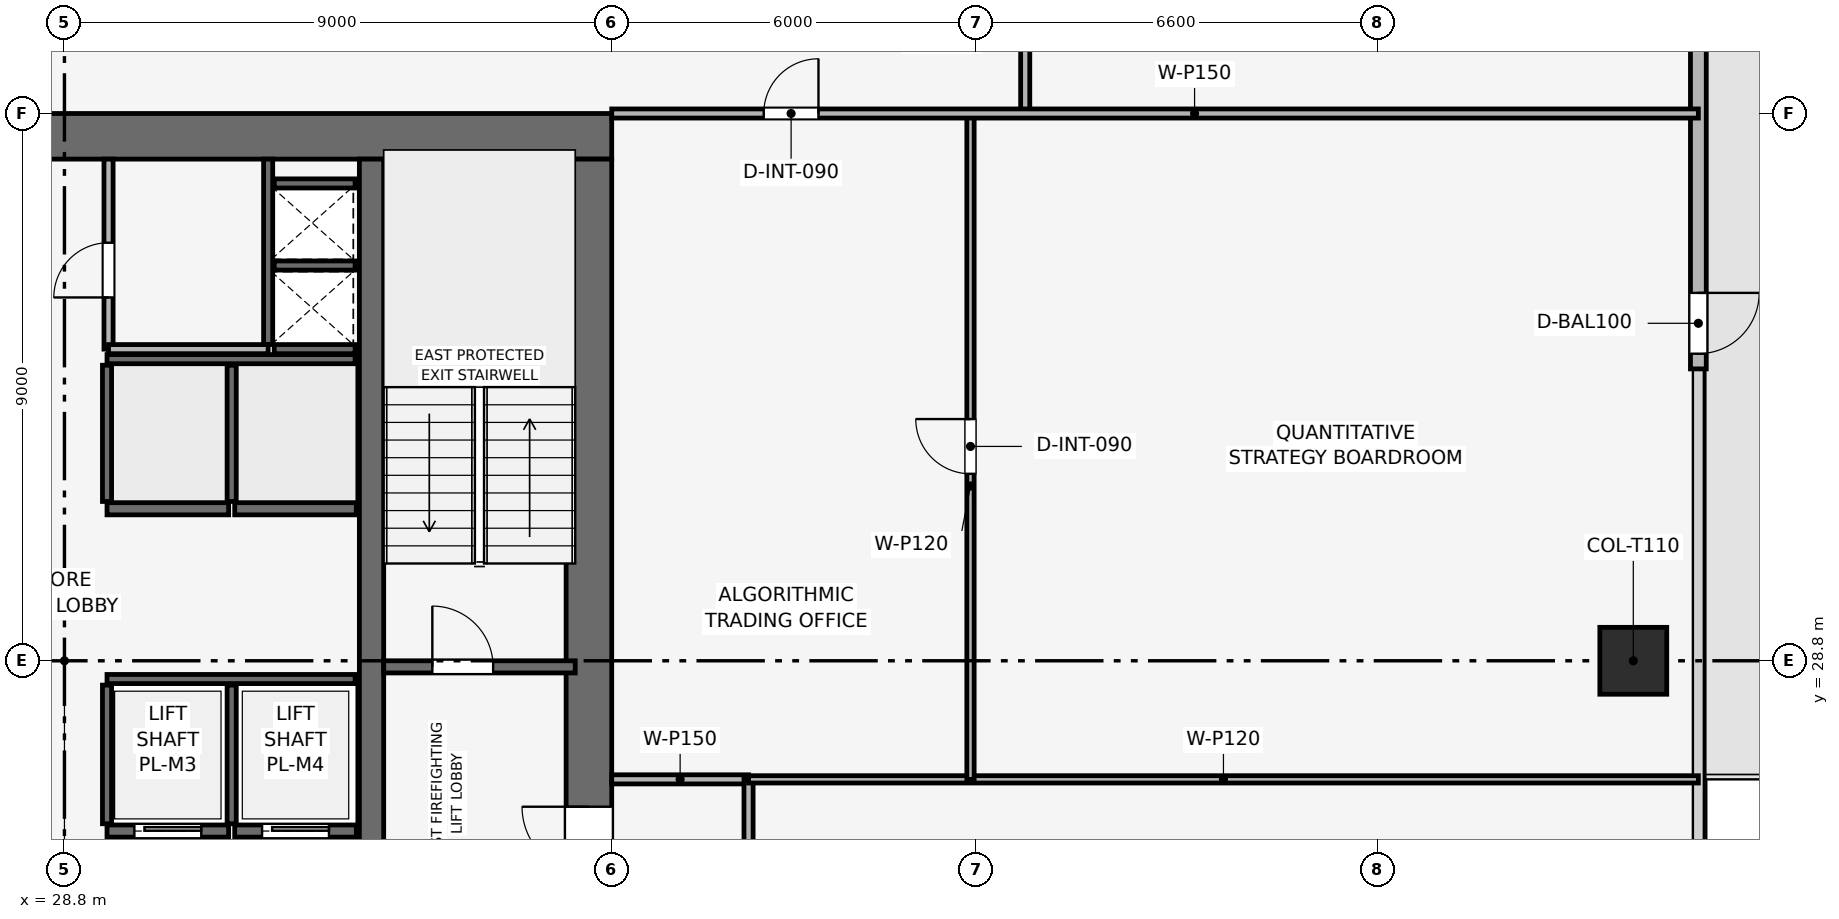
"""IFC4 building model, lengths in metres.
Left out: names, types, materials, properties, quantities, classifications, styles, units other than length and angle.
Written with IfcOpenShell. Run it as: python <this file> out.ifc"""

import sys

from ifc_helpers import new_model, si_unit, direction, frame, frame_2d, origin, origin_2d, place, context, subcontext, project, spatial, rectangle, extrude, element, fill, save


model = new_model("IFC4")
c1 = context("Model", 3, precision=1e-05, world=origin(), true_north=direction((0.0, 1.0)))
c2 = subcontext(c1, "Body", "Model", "MODEL_VIEW")
j1 = project(units=[si_unit("LENGTHUNIT", "METRE"), si_unit("PLANEANGLEUNIT", "RADIAN")], contexts=[c1])
p1 = place(None, origin())
s1 = spatial("IfcSite", under=j1, at=p1, CompositionType="ELEMENT")
p2 = place(p1, origin())
s2 = spatial("IfcBuilding", under=s1, at=p2, CompositionType="ELEMENT")
p3 = place(p2, frame((0.0, 0.0, 214.95)))
s3 = spatial("IfcBuildingStorey", under=s2, at=p3, CompositionType="ELEMENT", Elevation=214.95)
p4 = place(p3, frame((19.8, 37.425, 0.0), z_axis=(0.0, 0.0, 1.0), x_axis=(1.0, 0.0, 0.0)))
e1 = element("IfcWall", 1, at=p4, inside=s3, PredefinedType="SHEAR", context=c2, shape_type="SweptSolid", body=[
    extrude(rectangle(XDim=18.0, YDim=0.75, at=frame_2d((9.0, 0.0))), origin(), (0.0, 0.0, 1.0), 3.75),
])
p5 = place(p4, frame((7.05, 0.0, 0.0)))
e2 = element("IfcOpeningElement", 2, at=p5, cuts=e1, PredefinedType="OPENING", context=c2, shape_type="SweptSolid", body=[
    extrude(rectangle(XDim=1.1, YDim=2.15, at=frame_2d((0.55, 1.075))), frame((0.0, 0.385, 0.0), z_axis=(0.0, -1.0, 0.0), x_axis=(1.0, 0.0, 0.0)), (0.0, 0.0, 1.0), 0.77),
])
p6 = place(p3, frame((37.425, 20.55, 0.0), z_axis=(0.0, 0.0, 1.0), x_axis=(0.0, 1.0, 0.0)))
e3 = element("IfcWall", 3, at=p6, inside=s3, PredefinedType="SHEAR", context=c2, shape_type="SweptSolid", body=[
    extrude(rectangle(XDim=16.5, YDim=0.75, at=frame_2d((8.25, 0.0))), origin(), (0.0, 0.0, 1.0), 3.75),
])
p7 = place(p6, frame((4.75, 0.0, 0.0)))
e4 = element("IfcOpeningElement", 4, at=p7, cuts=e3, PredefinedType="OPENING", context=c2, shape_type="SweptSolid", body=[
    extrude(rectangle(XDim=1.1, YDim=2.15, at=frame_2d((0.55, 1.075))), frame((0.0, 0.385, 0.0), z_axis=(0.0, -1.0, 0.0), x_axis=(1.0, 0.0, 0.0)), (0.0, 0.0, 1.0), 0.77),
])
p8 = place(p3, frame((33.85, 20.55, 0.0), z_axis=(0.0, 0.0, 1.0), x_axis=(0.0, 1.0, 0.0)))
e5 = element("IfcWall", 5, at=p8, inside=s3, PredefinedType="SHEAR", context=c2, shape_type="SweptSolid", body=[
    extrude(rectangle(XDim=16.5, YDim=0.4, at=frame_2d((8.25, 0.0))), origin(), (0.0, 0.0, 1.0), 3.75),
])
p9 = place(p3, frame((54.6, 28.8, 0.003), z_axis=(0.0, 0.0, 1.0), x_axis=(1.0, 0.0, 0.0)))
e6 = element("IfcColumn", 6, at=p9, inside=s3, PredefinedType="COLUMN", context=c2, shape_type="SweptSolid", body=[
    extrude(rectangle(XDim=1.1, YDim=1.1, at=origin_2d()), origin(), (0.0, 0.0, 1.0), 3.494),
])
p10 = place(p3, frame((55.67, 48.3, 0.0), z_axis=(0.0, 0.0, 1.0), x_axis=(0.0, -1.0, 0.0)))
e7 = element("IfcWall", 7, at=p10, inside=s3, PredefinedType="SOLIDWALL", context=c2, shape_type="SweptSolid", body=[
    extrude(rectangle(XDim=14.7, YDim=0.26, at=frame_2d((7.35, 0.0))), origin(), (0.0, 0.0, 1.0), 3.5),
])
p11 = place(p10, frame((13.45, 0.0, 0.0)))
e8 = element("IfcOpeningElement", 8, at=p11, cuts=e7, PredefinedType="OPENING", context=c2, shape_type="SweptSolid", body=[
    extrude(rectangle(XDim=1.0, YDim=2.2, at=frame_2d((0.5, 1.1))), frame((0.0, 0.14, 0.0), z_axis=(0.0, -1.0, 0.0), x_axis=(1.0, 0.0, 0.0)), (0.0, 0.0, 1.0), 0.28),
])
p12 = place(p3, frame((34.05, 28.7, 0.0), z_axis=(0.0, 0.0, 1.0), x_axis=(1.0, 0.0, 0.0)))
e9 = element("IfcWall", 9, at=p12, inside=s3, PredefinedType="SHEAR", context=c2, shape_type="SweptSolid", body=[
    extrude(rectangle(XDim=3.15, YDim=0.2, at=frame_2d((1.575, 0.0))), origin(), (0.0, 0.0, 1.0), 3.5),
])
p13 = place(p12, frame((0.8, 0.0, 0.0)))
e10 = element("IfcOpeningElement", 10, at=p13, cuts=e9, PredefinedType="OPENING", context=c2, shape_type="SweptSolid", body=[
    extrude(rectangle(XDim=1.0, YDim=2.1, at=frame_2d((0.5, 1.05))), frame((0.0, 0.11, 0.0), z_axis=(0.0, -1.0, 0.0), x_axis=(1.0, 0.0, 0.0)), (0.0, 0.0, 1.0), 0.22),
])
p14 = place(p3, frame((32.15, 34.0, 0.0), z_axis=(0.0, 0.0, 1.0), x_axis=(0.0, 1.0, 0.0)))
e11 = element("IfcWall", 11, at=p14, inside=s3, PredefinedType="SHEAR", context=c2, shape_type="SweptSolid", body=[
    extrude(rectangle(XDim=3.05, YDim=0.15, at=frame_2d((1.525, 0.0))), origin(), (0.0, 0.0, 1.0), 3.5),
])
for number, where, z_axis, x_axis in (
    (12, (32.25, 33.925, 0.0), (0.0, 0.0, 1.0), (1.0, 0.0, 0.0)),
    (13, (32.25, 35.3, 0.0), (0.0, 0.0, 1.0), (1.0, 0.0, 0.0)),
):
    element("IfcWall", number, at=place(p3, frame(where, z_axis=z_axis, x_axis=x_axis)), inside=s3, PredefinedType="SHEAR", context=c2, shape_type="SweptSolid", body=[
        extrude(rectangle(XDim=1.33, YDim=0.15, at=frame_2d((0.665, 0.0))), origin(), (0.0, 0.0, 1.0), 3.5),
    ])
p15 = place(p3, frame((29.5, 26.0, 0.0), z_axis=(0.0, 0.0, 1.0), x_axis=(1.0, 0.0, 0.0)))
e14 = element("IfcWall", 14, at=p15, inside=s3, PredefinedType="SHEAR", context=c2, shape_type="SweptSolid", body=[
    extrude(rectangle(XDim=2.0, YDim=0.2, at=frame_2d((1.0, 0.0))), origin(), (0.0, 0.0, 1.0), 3.5),
])
p16 = place(p15, frame((0.45, 0.0, 0.0)))
e15 = element("IfcOpeningElement", 15, at=p16, cuts=e14, PredefinedType="OPENING", context=c2, shape_type="SweptSolid", body=[
    extrude(rectangle(XDim=1.1, YDim=2.15, at=frame_2d((0.55, 1.075))), frame((0.0, 0.11, 0.0), z_axis=(0.0, -1.0, 0.0), x_axis=(1.0, 0.0, 0.0)), (0.0, 0.0, 1.0), 0.22),
])
p17 = place(p3, frame((31.6, 26.0, 0.0), z_axis=(0.0, 0.0, 1.0), x_axis=(1.0, 0.0, 0.0)))
e16 = element("IfcWall", 16, at=p17, inside=s3, PredefinedType="SHEAR", context=c2, shape_type="SweptSolid", body=[
    extrude(rectangle(XDim=2.0, YDim=0.2, at=frame_2d((1.0, 0.0))), origin(), (0.0, 0.0, 1.0), 3.5),
])
p18 = place(p17, frame((0.45, 0.0, 0.0)))
e17 = element("IfcOpeningElement", 17, at=p18, cuts=e16, PredefinedType="OPENING", context=c2, shape_type="SweptSolid", body=[
    extrude(rectangle(XDim=1.1, YDim=2.15, at=frame_2d((0.55, 1.075))), frame((0.0, 0.11, 0.0), z_axis=(0.0, -1.0, 0.0), x_axis=(1.0, 0.0, 0.0)), (0.0, 0.0, 1.0), 0.22),
])
for number, where, z_axis, x_axis in (
    (18, (29.5, 31.3, 0.0), (0.0, 0.0, 1.0), (1.0, 0.0, 0.0)),
    (19, (31.6, 31.3, 0.0), (0.0, 0.0, 1.0), (1.0, 0.0, 0.0)),
):
    element("IfcWall", number, at=place(p3, frame(where, z_axis=z_axis, x_axis=x_axis)), inside=s3, PredefinedType="SHEAR", context=c2, shape_type="SweptSolid", body=[
        extrude(rectangle(XDim=2.0, YDim=0.2, at=frame_2d((1.0, 0.0))), origin(), (0.0, 0.0, 1.0), 3.5),
    ])
p19 = place(p3, frame((32.25, 36.65, 0.0), z_axis=(0.0, 0.0, 1.0), x_axis=(1.0, 0.0, 0.0)))
e20 = element("IfcWall", 20, at=p19, inside=s3, PredefinedType="SHEAR", context=c2, shape_type="SweptSolid", body=[
    extrude(rectangle(XDim=1.33, YDim=0.15, at=frame_2d((0.665, 0.0))), origin(), (0.0, 0.0, 1.0), 3.5),
])
p20 = place(p3, frame((29.5, 28.5, 0.0), z_axis=(0.0, 0.0, 1.0), x_axis=(1.0, 0.0, 0.0)))
e21 = element("IfcWall", 21, at=p20, inside=s3, PredefinedType="SHEAR", context=c2, shape_type="SweptSolid", body=[
    extrude(rectangle(XDim=4.08, YDim=0.15, at=frame_2d((2.04, 0.0))), origin(), (0.0, 0.0, 1.0), 3.5),
])
for number, where, z_axis, x_axis in (
    (22, (29.5, 26.12, 0.0), (0.0, 0.0, 1.0), (0.0, 1.0, 0.0)),
    (23, (31.55, 26.12, 0.0), (0.0, 0.0, 1.0), (0.0, 1.0, 0.0)),
):
    element("IfcWall", number, at=place(p3, frame(where, z_axis=z_axis, x_axis=x_axis)), inside=s3, PredefinedType="SHEAR", context=c2, shape_type="SweptSolid", body=[
        extrude(rectangle(XDim=2.28, YDim=0.15, at=frame_2d((1.14, 0.0))), origin(), (0.0, 0.0, 1.0), 3.5),
    ])
p21 = place(p3, frame((29.5, 33.76, 0.0), z_axis=(0.0, 0.0, 1.0), x_axis=(1.0, 0.0, 0.0)))
e24 = element("IfcWall", 24, at=p21, inside=s3, PredefinedType="SHEAR", context=c2, shape_type="SweptSolid", body=[
    extrude(rectangle(XDim=4.08, YDim=0.15, at=frame_2d((2.04, 0.0))), origin(), (0.0, 0.0, 1.0), 3.5),
])
for number, where, z_axis, x_axis in (
    (25, (29.5, 31.42, 0.0), (0.0, 0.0, 1.0), (0.0, 1.0, 0.0)),
    (26, (31.55, 31.42, 0.0), (0.0, 0.0, 1.0), (0.0, 1.0, 0.0)),
):
    element("IfcWall", number, at=place(p3, frame(where, z_axis=z_axis, x_axis=x_axis)), inside=s3, PredefinedType="SHEAR", context=c2, shape_type="SweptSolid", body=[
        extrude(rectangle(XDim=2.24, YDim=0.15, at=frame_2d((1.12, 0.0))), origin(), (0.0, 0.0, 1.0), 3.5),
    ])
p22 = place(p3, frame((29.525, 33.925, 0.0), z_axis=(0.0, 0.0, 1.0), x_axis=(0.0, 1.0, 0.0)))
e27 = element("IfcWall", 27, at=p22, inside=s3, PredefinedType="PARTITIONING", context=c2, shape_type="SweptSolid", body=[
    extrude(rectangle(XDim=3.125, YDim=0.15, at=frame_2d((1.562, 0.0))), origin(), (0.0, 0.0, 1.0), 3.5),
])
p23 = place(p22, frame((0.85, 0.0, 0.0)))
e28 = element("IfcOpeningElement", 28, at=p23, cuts=e27, PredefinedType="OPENING", context=c2, shape_type="SweptSolid", body=[
    extrude(rectangle(XDim=0.9, YDim=2.1, at=frame_2d((0.45, 1.05))), frame((0.0, 0.085, 0.0), z_axis=(0.0, -1.0, 0.0), x_axis=(1.0, 0.0, 0.0)), (0.0, 0.0, 1.0), 0.17),
])
p24 = place(p3, frame((29.525, 33.925, 0.0), z_axis=(0.0, 0.0, 1.0), x_axis=(1.0, 0.0, 0.0)))
e29 = element("IfcWall", 29, at=p24, inside=s3, PredefinedType="PARTITIONING", context=c2, shape_type="SweptSolid", body=[
    extrude(rectangle(XDim=2.625, YDim=0.15, at=frame_2d((1.312, 0.0))), origin(), (0.0, 0.0, 1.0), 3.5),
])
p25 = place(p3, frame((37.8, 26.85, 0.0), z_axis=(0.0, 0.0, 1.0), x_axis=(1.0, 0.0, 0.0)))
e30 = element("IfcWall", 30, at=p25, inside=s3, PredefinedType="PARTITIONING", context=c2, shape_type="SweptSolid", body=[
    extrude(rectangle(XDim=2.25, YDim=0.15, at=frame_2d((1.125, 0.0))), origin(), (0.0, 0.0, 1.0), 3.5),
])
p26 = place(p3, frame((40.05, 19.8, 0.0), z_axis=(0.0, 0.0, 1.0), x_axis=(0.0, 1.0, 0.0)))
e31 = element("IfcWall", 31, at=p26, inside=s3, PredefinedType="PARTITIONING", context=c2, shape_type="SweptSolid", body=[
    extrude(rectangle(XDim=7.05, YDim=0.15, at=frame_2d((3.525, 0.0))), origin(), (0.0, 0.0, 1.0), 3.035),
])
p27 = place(p3, frame((40.05, 26.85, 0.0), z_axis=(0.0, 0.0, 1.0), x_axis=(1.0, 0.0, 0.0)))
e32 = element("IfcWall", 32, at=p27, inside=s3, PredefinedType="PARTITIONING", context=c2, shape_type="SweptSolid", body=[
    extrude(rectangle(XDim=15.62, YDim=0.12, at=frame_2d((7.81, 0.0))), origin(), (0.0, 0.0, 1.0), 2.885),
])
p28 = place(p3, frame((43.7, 26.85, 0.0), z_axis=(0.0, 0.0, 1.0), x_axis=(0.0, 1.0, 0.0)))
e33 = element("IfcWall", 33, at=p28, inside=s3, PredefinedType="PARTITIONING", context=c2, shape_type="SweptSolid", body=[
    extrude(rectangle(XDim=10.95, YDim=0.12, at=frame_2d((5.475, 0.0))), origin(), (0.0, 0.0, 1.0), 3.035),
])
p29 = place(p28, frame((5.025, 0.0, 0.0)))
e34 = element("IfcOpeningElement", 34, at=p29, cuts=e33, PredefinedType="OPENING", context=c2, shape_type="SweptSolid", body=[
    extrude(rectangle(XDim=0.9, YDim=2.1, at=frame_2d((0.45, 1.05))), frame((0.0, 0.07, 0.0), z_axis=(0.0, -1.0, 0.0), x_axis=(1.0, 0.0, 0.0)), (0.0, 0.0, 1.0), 0.14),
])
p30 = place(p3, frame((44.6, 37.8, 0.0), z_axis=(0.0, 0.0, 1.0), x_axis=(0.0, 1.0, 0.0)))
e35 = element("IfcWall", 35, at=p30, inside=s3, PredefinedType="PARTITIONING", context=c2, shape_type="SweptSolid", body=[
    extrude(rectangle(XDim=2.4, YDim=0.15, at=frame_2d((1.2, 0.0))), origin(), (0.0, 0.0, 1.0), 3.5),
])
p31 = place(p3, frame((37.8, 37.8, 0.0), z_axis=(0.0, 0.0, 1.0), x_axis=(1.0, 0.0, 0.0)))
e36 = element("IfcWall", 36, at=p31, inside=s3, PredefinedType="PARTITIONING", context=c2, shape_type="SweptSolid", body=[
    extrude(rectangle(XDim=17.87, YDim=0.15, at=frame_2d((8.935, 0.0))), origin(), (0.0, 0.0, 1.0), 2.885),
])
p32 = place(p31, frame((2.5, 0.0, 0.0)))
e37 = element("IfcOpeningElement", 37, at=p32, cuts=e36, PredefinedType="OPENING", context=c2, shape_type="SweptSolid", body=[
    extrude(rectangle(XDim=0.9, YDim=2.1, at=frame_2d((0.45, 1.05))), frame((0.0, 0.085, 0.0), z_axis=(0.0, -1.0, 0.0), x_axis=(1.0, 0.0, 0.0)), (0.0, 0.0, 1.0), 0.17),
])
p33 = place(p11, origin())
e38 = element("IfcDoor", 38, at=p33, inside=s3, OperationType="SINGLE_SWING_LEFT", PredefinedType="DOOR", context=c2, shape_type="SweptSolid", body=[
    extrude(rectangle(XDim=1.0, YDim=2.2, at=frame_2d((0.5, 1.1))), frame((0.0, 0.025, 0.0), z_axis=(0.0, -1.0, 0.0), x_axis=(1.0, 0.0, 0.0)), (0.0, 0.0, 1.0), 0.05),
])
fill(e8, e38)
p34 = place(p13, origin())
e39 = element("IfcDoor", 39, at=p34, inside=s3, OperationType="SINGLE_SWING_LEFT", PredefinedType="DOOR", context=c2, shape_type="SweptSolid", body=[
    extrude(rectangle(XDim=1.0, YDim=2.1, at=frame_2d((0.5, 1.05))), frame((0.0, 0.025, 0.0), z_axis=(0.0, -1.0, 0.0), x_axis=(1.0, 0.0, 0.0)), (0.0, 0.0, 1.0), 0.05),
])
fill(e10, e39)
p35 = place(p16, origin())
e40 = element("IfcDoor", 40, at=p35, inside=s3, OperationType="SLIDING_TO_RIGHT", PredefinedType="DOOR", context=c2, shape_type="SweptSolid", body=[
    extrude(rectangle(XDim=1.1, YDim=2.15, at=frame_2d((0.55, 1.075))), frame((0.0, 0.025, 0.0), z_axis=(0.0, -1.0, 0.0), x_axis=(1.0, 0.0, 0.0)), (0.0, 0.0, 1.0), 0.05),
])
fill(e15, e40)
p36 = place(p18, origin())
e41 = element("IfcDoor", 41, at=p36, inside=s3, OperationType="SLIDING_TO_RIGHT", PredefinedType="DOOR", context=c2, shape_type="SweptSolid", body=[
    extrude(rectangle(XDim=1.1, YDim=2.15, at=frame_2d((0.55, 1.075))), frame((0.0, 0.025, 0.0), z_axis=(0.0, -1.0, 0.0), x_axis=(1.0, 0.0, 0.0)), (0.0, 0.0, 1.0), 0.05),
])
fill(e17, e41)
p37 = place(p23, origin())
e42 = element("IfcDoor", 42, at=p37, inside=s3, OperationType="SINGLE_SWING_LEFT", PredefinedType="DOOR", context=c2, shape_type="SweptSolid", body=[
    extrude(rectangle(XDim=0.9, YDim=2.1, at=frame_2d((0.45, 1.05))), frame((0.0, 0.025, 0.0), z_axis=(0.0, -1.0, 0.0), x_axis=(1.0, 0.0, 0.0)), (0.0, 0.0, 1.0), 0.05),
])
fill(e28, e42)
p38 = place(p29, origin())
e43 = element("IfcDoor", 43, at=p38, inside=s3, OperationType="SINGLE_SWING_RIGHT", PredefinedType="DOOR", context=c2, shape_type="SweptSolid", body=[
    extrude(rectangle(XDim=0.9, YDim=2.1, at=frame_2d((0.45, 1.05))), frame((0.0, 0.025, 0.0), z_axis=(0.0, -1.0, 0.0), x_axis=(1.0, 0.0, 0.0)), (0.0, 0.0, 1.0), 0.05),
])
fill(e34, e43)
p39 = place(p32, origin())
e44 = element("IfcDoor", 44, at=p39, inside=s3, OperationType="SINGLE_SWING_RIGHT", PredefinedType="DOOR", context=c2, shape_type="SweptSolid", body=[
    extrude(rectangle(XDim=0.9, YDim=2.1, at=frame_2d((0.45, 1.05))), frame((0.0, 0.025, 0.0), z_axis=(0.0, -1.0, 0.0), x_axis=(1.0, 0.0, 0.0)), (0.0, 0.0, 1.0), 0.05),
])
fill(e37, e44)
p40 = place(p7, origin())
e45 = element("IfcDoor", 45, at=p40, inside=s3, OperationType="SINGLE_SWING_RIGHT", PredefinedType="DOOR", context=c2, shape_type="SweptSolid", body=[
    extrude(rectangle(XDim=1.1, YDim=2.15, at=frame_2d((0.55, 1.075))), frame((0.0, 0.025, 0.0), z_axis=(0.0, -1.0, 0.0), x_axis=(1.0, 0.0, 0.0)), (0.0, 0.0, 1.0), 0.05),
])
fill(e4, e45)
save(model, sys.argv[1])
